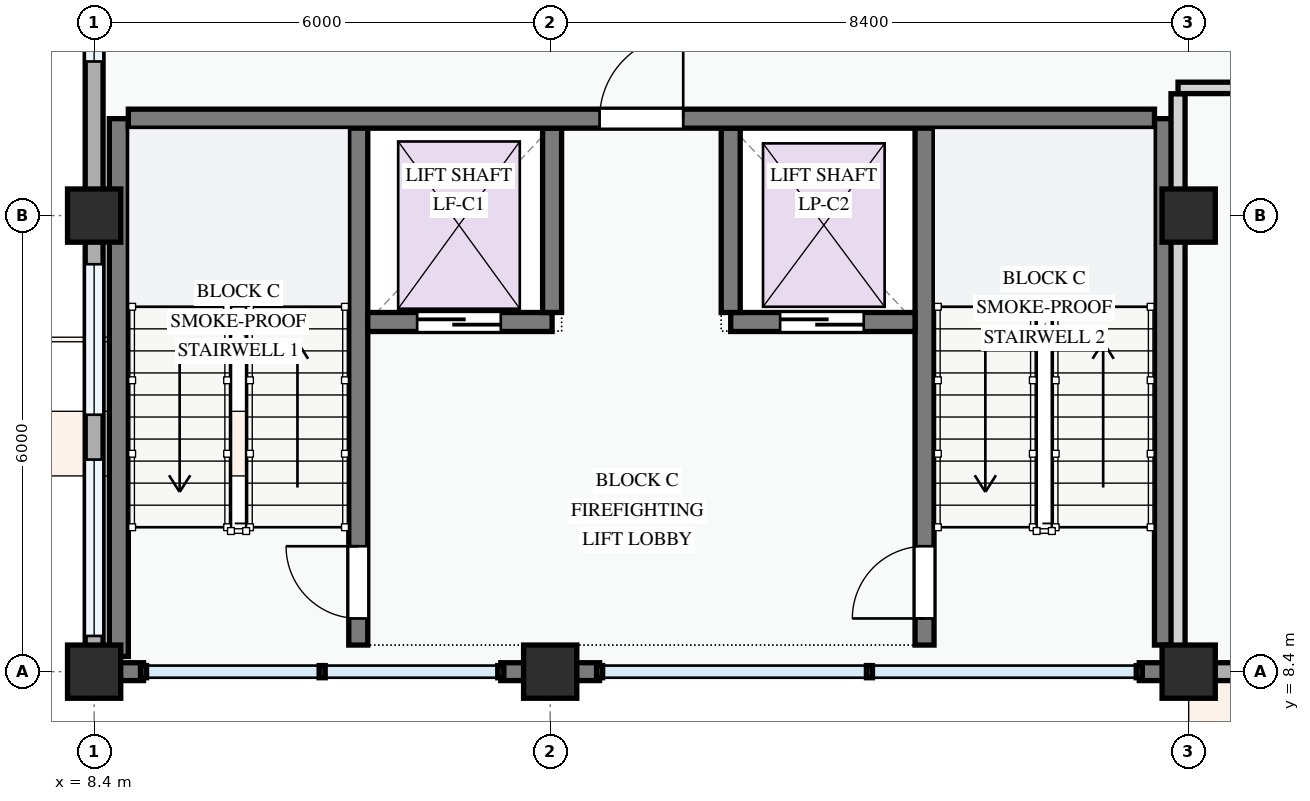
"""IFC4 building model, lengths in metres.
Left out: names, types, materials, properties, quantities, classifications, styles, units other than length and angle.
Written with IfcOpenShell. Run it as: python <this file> out.ifc"""

import sys

from ifc_helpers import new_model, si_unit, direction, frame, frame_2d, origin, origin_2d, place, context, subcontext, project, spatial, rectangle, extrude, element, fill, save


model = new_model("IFC4")
c1 = context("Model", 3, precision=1e-05, world=origin(), true_north=direction((0.0, 1.0)))
c2 = subcontext(c1, "Body", "Model", "MODEL_VIEW")
j1 = project(units=[si_unit("LENGTHUNIT", "METRE"), si_unit("PLANEANGLEUNIT", "RADIAN")], contexts=[c1])
p1 = place(None, origin())
s1 = spatial("IfcSite", under=j1, at=p1, CompositionType="ELEMENT")
p2 = place(p1, origin())
s2 = spatial("IfcBuilding", under=s1, at=p2, CompositionType="ELEMENT")
p3 = place(p2, frame((0.0, 0.0, 4.5)))
s3 = spatial("IfcBuildingStorey", under=s2, at=p3, CompositionType="ELEMENT", Elevation=4.5)
for number, where, z_axis, x_axis in (
    (1, (8.4, 8.4, 0.0), (0.0, 0.0, 1.0), (1.0, 0.0, 0.0)),
    (2, (8.4, 14.4, 0.0), (0.0, 0.0, 1.0), (1.0, 0.0, 0.0)),
    (3, (14.4, 8.4, 0.0), (0.0, 0.0, 1.0), (1.0, 0.0, 0.0)),
    (4, (22.8, 8.4, 0.0), (0.0, 0.0, 1.0), (1.0, 0.0, 0.0)),
    (5, (22.8, 14.4, 0.0), (0.0, 0.0, 1.0), (1.0, 0.0, 0.0)),
):
    element("IfcColumn", number, at=place(p3, frame(where, z_axis=z_axis, x_axis=x_axis)), inside=s3, PredefinedType="COLUMN", context=c2, shape_type="SweptSolid", body=[
        extrude(rectangle(XDim=0.7, YDim=0.7, at=origin_2d()), origin(), (0.0, 0.0, 1.0), 3.6),
    ])
p4 = place(p3, frame((8.4, 22.8, 0.0), z_axis=(0.0, 0.0, 1.0), x_axis=(0.0, -1.0, 0.0)))
e6 = element("IfcWall", 6, at=p4, inside=s3, PredefinedType="STANDARD", context=c2, shape_type="SweptSolid", body=[
    extrude(rectangle(XDim=8.4, YDim=0.235, at=frame_2d((4.2, 0.0))), origin(), (0.0, 0.0, 1.0), 2.725),
])
p5 = place(p4, frame((0.995, 0.0, 0.78)))
e7 = element("IfcOpeningElement", 7, at=p5, cuts=e6, PredefinedType="OPENING", context=c2, shape_type="SweptSolid", body=[
    extrude(rectangle(XDim=2.4, YDim=1.65, at=frame_2d((1.2, 0.825))), frame((0.0, 0.127, 0.0), z_axis=(0.0, -1.0, 0.0), x_axis=(1.0, 0.0, 0.0)), (0.0, 0.0, 1.0), 0.255),
])
p6 = place(p4, frame((4.952, 0.0, 0.78)))
e8 = element("IfcOpeningElement", 8, at=p6, cuts=e6, PredefinedType="OPENING", context=c2, shape_type="SweptSolid", body=[
    extrude(rectangle(XDim=1.42, YDim=1.38, at=frame_2d((0.71, 0.69))), frame((0.0, 0.127, 0.0), z_axis=(0.0, -1.0, 0.0), x_axis=(1.0, 0.0, 0.0)), (0.0, 0.0, 1.0), 0.255),
])
p7 = place(p3, frame((8.4, 14.4, 0.0), z_axis=(0.0, 0.0, 1.0), x_axis=(0.0, -1.0, 0.0)))
e9 = element("IfcWall", 9, at=p7, inside=s3, PredefinedType="STANDARD", context=c2, shape_type="SweptSolid", body=[
    extrude(rectangle(XDim=6.0, YDim=0.235, at=frame_2d((3.0, 0.0))), origin(), (0.0, 0.0, 1.0), 2.875),
])
p8 = place(p7, frame((0.64, 0.0, 0.78)))
e10 = element("IfcOpeningElement", 10, at=p8, cuts=e9, PredefinedType="OPENING", context=c2, shape_type="SweptSolid", body=[
    extrude(rectangle(XDim=1.98, YDim=1.5, at=frame_2d((0.99, 0.75))), frame((0.0, 0.127, 0.0), z_axis=(0.0, -1.0, 0.0), x_axis=(1.0, 0.0, 0.0)), (0.0, 0.0, 1.0), 0.255),
])
p9 = place(p7, frame((3.21, 0.0, 0.78)))
e11 = element("IfcOpeningElement", 11, at=p9, cuts=e9, PredefinedType="OPENING", context=c2, shape_type="SweptSolid", body=[
    extrude(rectangle(XDim=2.32, YDim=1.5, at=frame_2d((1.16, 0.75))), frame((0.0, 0.127, 0.0), z_axis=(0.0, -1.0, 0.0), x_axis=(1.0, 0.0, 0.0)), (0.0, 0.0, 1.0), 0.255),
])
p10 = place(p3, frame((8.52, 8.4, 0.0), z_axis=(0.0, 0.0, 1.0), x_axis=(1.0, 0.0, 0.0)))
e12 = element("IfcWall", 12, at=p10, inside=s3, PredefinedType="STANDARD", context=c2, shape_type="SweptSolid", body=[
    extrude(rectangle(XDim=0.531, YDim=0.235, at=frame_2d((0.265, 0.0))), origin(), (0.0, 0.0, 1.0), 3.34),
])
p11 = place(p3, frame((13.75, 8.4, 0.0), z_axis=(0.0, 0.0, 1.0), x_axis=(1.0, 0.0, 0.0)))
e13 = element("IfcWall", 13, at=p11, inside=s3, PredefinedType="STANDARD", context=c2, shape_type="SweptSolid", body=[
    extrude(rectangle(XDim=0.65, YDim=0.235, at=frame_2d((0.325, 0.0))), origin(), (0.0, 0.0, 1.0), 3.34),
])
for number, where, z_axis, x_axis in (
    (14, (14.4, 8.4, 0.0), (0.0, 0.0, 1.0), (1.0, 0.0, 0.0)),
    (15, (22.15, 8.4, 0.0), (0.0, 0.0, 1.0), (1.0, 0.0, 0.0)),
):
    element("IfcWall", number, at=place(p3, frame(where, z_axis=z_axis, x_axis=x_axis)), inside=s3, PredefinedType="STANDARD", context=c2, shape_type="SweptSolid", body=[
        extrude(rectangle(XDim=0.65, YDim=0.235, at=frame_2d((0.325, 0.0))), origin(), (0.0, 0.0, 1.0), 3.34),
    ])
p12 = place(p3, frame((22.8, 8.4, 0.0), z_axis=(0.0, 0.0, 1.0), x_axis=(1.0, 0.0, 0.0)))
e16 = element("IfcWall", 16, at=p12, inside=s3, PredefinedType="STANDARD", context=c2, shape_type="SweptSolid", body=[
    extrude(rectangle(XDim=6.0, YDim=0.235, at=frame_2d((3.0, 0.0))), origin(), (0.0, 0.0, 1.0), 2.775),
])
p13 = place(p12, frame((0.57, 0.0, 0.78)))
e17 = element("IfcOpeningElement", 17, at=p13, cuts=e16, PredefinedType="OPENING", context=c2, shape_type="SweptSolid", body=[
    extrude(rectangle(XDim=2.12, YDim=1.44, at=frame_2d((1.06, 0.72))), frame((0.0, 0.127, 0.0), z_axis=(0.0, -1.0, 0.0), x_axis=(1.0, 0.0, 0.0)), (0.0, 0.0, 1.0), 0.255),
])
p14 = place(p12, frame((3.82, 0.0, 0.78)))
e18 = element("IfcOpeningElement", 18, at=p14, cuts=e16, PredefinedType="OPENING", context=c2, shape_type="SweptSolid", body=[
    extrude(rectangle(XDim=1.1, YDim=1.3, at=frame_2d((0.55, 0.65))), frame((0.0, 0.127, 0.0), z_axis=(0.0, -1.0, 0.0), x_axis=(1.0, 0.0, 0.0)), (0.0, 0.0, 1.0), 0.255),
])
p15 = place(p3, frame((11.875, 8.75, 0.0), z_axis=(0.0, 0.0, 1.0), x_axis=(0.0, 1.0, 0.0)))
e19 = element("IfcWall", 19, at=p15, inside=s3, PredefinedType="SHEAR", context=c2, shape_type="SweptSolid", body=[
    extrude(rectangle(XDim=6.925, YDim=0.25, at=frame_2d((3.462, 0.0))), origin(), (0.0, 0.0, 1.0), 3.3),
])
p16 = place(p15, frame((0.35, 0.0, 0.0)))
e20 = element("IfcOpeningElement", 20, at=p16, cuts=e19, PredefinedType="OPENING", context=c2, shape_type="SweptSolid", body=[
    extrude(rectangle(XDim=0.95, YDim=2.1, at=frame_2d((0.475, 1.05))), frame((0.0, 0.135, 0.0), z_axis=(0.0, -1.0, 0.0), x_axis=(1.0, 0.0, 0.0)), (0.0, 0.0, 1.0), 0.27),
])
p17 = place(p3, frame((8.725, 8.6, 0.0), z_axis=(0.0, 0.0, 1.0), x_axis=(0.0, 1.0, 0.0)))
e21 = element("IfcWall", 21, at=p17, inside=s3, PredefinedType="SHEAR", context=c2, shape_type="SweptSolid", body=[
    extrude(rectangle(XDim=7.075, YDim=0.25, at=frame_2d((3.538, 0.0))), origin(), (0.0, 0.0, 1.0), 3.3),
])
p18 = place(p3, frame((22.475, 8.75, 0.0), z_axis=(0.0, 0.0, 1.0), x_axis=(0.0, 1.0, 0.0)))
e22 = element("IfcWall", 22, at=p18, inside=s3, PredefinedType="SHEAR", context=c2, shape_type="SweptSolid", body=[
    extrude(rectangle(XDim=6.925, YDim=0.25, at=frame_2d((3.462, 0.0))), origin(), (0.0, 0.0, 1.0), 3.3),
])
p19 = place(p3, frame((19.325, 8.75, 0.0), z_axis=(0.0, 0.0, 1.0), x_axis=(0.0, 1.0, 0.0)))
e23 = element("IfcWall", 23, at=p19, inside=s3, PredefinedType="SHEAR", context=c2, shape_type="SweptSolid", body=[
    extrude(rectangle(XDim=6.925, YDim=0.25, at=frame_2d((3.462, 0.0))), origin(), (0.0, 0.0, 1.0), 3.3),
])
p20 = place(p19, frame((0.35, 0.0, 0.0)))
e24 = element("IfcOpeningElement", 24, at=p20, cuts=e23, PredefinedType="OPENING", context=c2, shape_type="SweptSolid", body=[
    extrude(rectangle(XDim=0.95, YDim=2.1, at=frame_2d((0.475, 1.05))), frame((0.0, 0.135, 0.0), z_axis=(0.0, -1.0, 0.0), x_axis=(1.0, 0.0, 0.0)), (0.0, 0.0, 1.0), 0.27),
])
p21 = place(p3, frame((12.0, 13.0, 0.0), z_axis=(0.0, 0.0, 1.0), x_axis=(1.0, 0.0, 0.0)))
e25 = element("IfcWall", 25, at=p21, inside=s3, PredefinedType="SHEAR", context=c2, shape_type="SweptSolid", body=[
    extrude(rectangle(XDim=2.425, YDim=0.25, at=frame_2d((1.212, 0.0))), origin(), (0.0, 0.0, 1.0), 3.3),
])
p22 = place(p21, frame((0.65, 0.0, 0.0)))
e26 = element("IfcOpeningElement", 26, at=p22, cuts=e25, PredefinedType="OPENING", context=c2, shape_type="SweptSolid", body=[
    extrude(rectangle(XDim=1.1, YDim=2.15, at=frame_2d((0.55, 1.075))), frame((0.0, 0.135, 0.0), z_axis=(0.0, -1.0, 0.0), x_axis=(1.0, 0.0, 0.0)), (0.0, 0.0, 1.0), 0.27),
])
p23 = place(p3, frame((16.775, 13.0, 0.0), z_axis=(0.0, 0.0, 1.0), x_axis=(1.0, 0.0, 0.0)))
e27 = element("IfcWall", 27, at=p23, inside=s3, PredefinedType="SHEAR", context=c2, shape_type="SweptSolid", body=[
    extrude(rectangle(XDim=2.425, YDim=0.25, at=frame_2d((1.212, 0.0))), origin(), (0.0, 0.0, 1.0), 3.3),
])
p24 = place(p23, frame((0.65, 0.0, 0.0)))
e28 = element("IfcOpeningElement", 28, at=p24, cuts=e27, PredefinedType="OPENING", context=c2, shape_type="SweptSolid", body=[
    extrude(rectangle(XDim=1.1, YDim=2.15, at=frame_2d((0.55, 1.075))), frame((0.0, 0.135, 0.0), z_axis=(0.0, -1.0, 0.0), x_axis=(1.0, 0.0, 0.0)), (0.0, 0.0, 1.0), 0.27),
])
for number, where, z_axis, x_axis in (
    (29, (14.425, 13.125, 0.0), (0.0, 0.0, 1.0), (0.0, 1.0, 0.0)),
    (30, (16.775, 13.125, 0.0), (0.0, 0.0, 1.0), (0.0, 1.0, 0.0)),
):
    element("IfcWall", number, at=place(p3, frame(where, z_axis=z_axis, x_axis=x_axis)), inside=s3, PredefinedType="SHEAR", context=c2, shape_type="SweptSolid", body=[
        extrude(rectangle(XDim=2.425, YDim=0.25, at=frame_2d((1.212, 0.0))), origin(), (0.0, 0.0, 1.0), 3.3),
    ])
p25 = place(p3, frame((8.85, 15.675, 0.0), z_axis=(0.0, 0.0, 1.0), x_axis=(1.0, 0.0, 0.0)))
e31 = element("IfcWall", 31, at=p25, inside=s3, PredefinedType="SHEAR", context=c2, shape_type="SweptSolid", body=[
    extrude(rectangle(XDim=13.5, YDim=0.25, at=frame_2d((6.75, 0.0))), origin(), (0.0, 0.0, 1.0), 3.3),
])
p26 = place(p25, frame((6.2, 0.0, 0.0)))
e32 = element("IfcOpeningElement", 32, at=p26, cuts=e31, PredefinedType="OPENING", context=c2, shape_type="SweptSolid", body=[
    extrude(rectangle(XDim=1.1, YDim=2.15, at=frame_2d((0.55, 1.075))), frame((0.0, 0.135, 0.0), z_axis=(0.0, -1.0, 0.0), x_axis=(1.0, 0.0, 0.0)), (0.0, 0.0, 1.0), 0.27),
])
p27 = place(p3, frame((22.66, 8.52, 0.0), z_axis=(0.0, 0.0, 1.0), x_axis=(0.0, 1.0, 0.0)))
e33 = element("IfcWall", 33, at=p27, inside=s3, PredefinedType="PARTITIONING", context=c2, shape_type="SweptSolid", body=[
    extrude(rectangle(XDim=7.483, YDim=0.185, at=frame_2d((3.742, 0.0))), origin(), (0.0, 0.0, 1.0), 2.725),
])
p28 = place(p3, frame((22.66, 16.08, 0.0), z_axis=(0.0, 0.0, 1.0), x_axis=(1.0, 0.0, 0.0)))
e34 = element("IfcWall", 34, at=p28, inside=s3, PredefinedType="PARTITIONING", context=c2, shape_type="SweptSolid", body=[
    extrude(rectangle(XDim=34.88, YDim=0.15, at=frame_2d((17.44, 0.0))), origin(), (0.0, 0.0, 1.0), 3.3),
])
p29 = place(p28, frame((2.749, 0.0, 0.0)))
e35 = element("IfcOpeningElement", 35, at=p29, cuts=e34, PredefinedType="OPENING", context=c2, shape_type="SweptSolid", body=[
    extrude(rectangle(XDim=0.95, YDim=2.1, at=frame_2d((0.475, 1.05))), frame((0.0, 0.085, 0.0), z_axis=(0.0, -1.0, 0.0), x_axis=(1.0, 0.0, 0.0)), (0.0, 0.0, 1.0), 0.17),
])
p30 = place(p28, frame((9.966, 0.0, 0.0)))
e36 = element("IfcOpeningElement", 36, at=p30, cuts=e34, PredefinedType="OPENING", context=c2, shape_type="SweptSolid", body=[
    extrude(rectangle(XDim=0.95, YDim=2.1, at=frame_2d((0.475, 1.05))), frame((0.0, 0.085, 0.0), z_axis=(0.0, -1.0, 0.0), x_axis=(1.0, 0.0, 0.0)), (0.0, 0.0, 1.0), 0.17),
])
p31 = place(p28, frame((24.343, 0.0, 0.0)))
e37 = element("IfcOpeningElement", 37, at=p31, cuts=e34, PredefinedType="OPENING", context=c2, shape_type="SweptSolid", body=[
    extrude(rectangle(XDim=0.95, YDim=2.1, at=frame_2d((0.475, 1.05))), frame((0.0, 0.085, 0.0), z_axis=(0.0, -1.0, 0.0), x_axis=(1.0, 0.0, 0.0)), (0.0, 0.0, 1.0), 0.17),
])
p32 = place(p28, frame((31.542, 0.0, 0.0)))
e38 = element("IfcOpeningElement", 38, at=p32, cuts=e34, PredefinedType="OPENING", context=c2, shape_type="SweptSolid", body=[
    extrude(rectangle(XDim=0.95, YDim=2.1, at=frame_2d((0.475, 1.05))), frame((0.0, 0.085, 0.0), z_axis=(0.0, -1.0, 0.0), x_axis=(1.0, 0.0, 0.0)), (0.0, 0.0, 1.0), 0.17),
])
p33 = place(p6, origin())
e39 = element("IfcWindow", 39, at=p33, inside=s3, PartitioningType="SINGLE_PANEL", PredefinedType="WINDOW", context=c2, shape_type="SweptSolid", body=[
    extrude(rectangle(XDim=1.42, YDim=1.38, at=frame_2d((0.71, 0.69))), frame((0.0, 0.03, 0.0), z_axis=(0.0, -1.0, 0.0), x_axis=(1.0, 0.0, 0.0)), (0.0, 0.0, 1.0), 0.06),
])
fill(e8, e39)
p34 = place(p8, origin())
e40 = element("IfcWindow", 40, at=p34, inside=s3, PartitioningType="DOUBLE_PANEL_VERTICAL", PredefinedType="WINDOW", context=c2, shape_type="SweptSolid", body=[
    extrude(rectangle(XDim=1.98, YDim=1.5, at=frame_2d((0.99, 0.75))), frame((0.0, 0.03, 0.0), z_axis=(0.0, -1.0, 0.0), x_axis=(1.0, 0.0, 0.0)), (0.0, 0.0, 1.0), 0.06),
])
fill(e10, e40)
p35 = place(p9, origin())
e41 = element("IfcWindow", 41, at=p35, inside=s3, PartitioningType="DOUBLE_PANEL_VERTICAL", PredefinedType="WINDOW", context=c2, shape_type="SweptSolid", body=[
    extrude(rectangle(XDim=2.32, YDim=1.5, at=frame_2d((1.16, 0.75))), frame((0.0, 0.03, 0.0), z_axis=(0.0, -1.0, 0.0), x_axis=(1.0, 0.0, 0.0)), (0.0, 0.0, 1.0), 0.06),
])
fill(e11, e41)
p36 = place(p16, origin())
e42 = element("IfcDoor", 42, at=p36, inside=s3, OperationType="SINGLE_SWING_RIGHT", PredefinedType="DOOR", context=c2, shape_type="SweptSolid", body=[
    extrude(rectangle(XDim=0.95, YDim=2.1, at=frame_2d((0.475, 1.05))), frame((0.0, 0.025, 0.0), z_axis=(0.0, -1.0, 0.0), x_axis=(1.0, 0.0, 0.0)), (0.0, 0.0, 1.0), 0.05),
])
fill(e20, e42)
p37 = place(p20, origin())
e43 = element("IfcDoor", 43, at=p37, inside=s3, OperationType="SINGLE_SWING_LEFT", PredefinedType="DOOR", context=c2, shape_type="SweptSolid", body=[
    extrude(rectangle(XDim=0.95, YDim=2.1, at=frame_2d((0.475, 1.05))), frame((0.0, 0.025, 0.0), z_axis=(0.0, -1.0, 0.0), x_axis=(1.0, 0.0, 0.0)), (0.0, 0.0, 1.0), 0.05),
])
fill(e24, e43)
p38 = place(p22, origin())
e44 = element("IfcDoor", 44, at=p38, inside=s3, OperationType="SLIDING_TO_LEFT", PredefinedType="DOOR", context=c2, shape_type="SweptSolid", body=[
    extrude(rectangle(XDim=1.1, YDim=2.15, at=frame_2d((0.55, 1.075))), frame((0.0, 0.025, 0.0), z_axis=(0.0, -1.0, 0.0), x_axis=(1.0, 0.0, 0.0)), (0.0, 0.0, 1.0), 0.05),
])
fill(e26, e44)
p39 = place(p24, origin())
e45 = element("IfcDoor", 45, at=p39, inside=s3, OperationType="SLIDING_TO_LEFT", PredefinedType="DOOR", context=c2, shape_type="SweptSolid", body=[
    extrude(rectangle(XDim=1.1, YDim=2.15, at=frame_2d((0.55, 1.075))), frame((0.0, 0.025, 0.0), z_axis=(0.0, -1.0, 0.0), x_axis=(1.0, 0.0, 0.0)), (0.0, 0.0, 1.0), 0.05),
])
fill(e28, e45)
p40 = place(p26, origin())
e46 = element("IfcDoor", 46, at=p40, inside=s3, OperationType="SINGLE_SWING_RIGHT", PredefinedType="DOOR", context=c2, shape_type="SweptSolid", body=[
    extrude(rectangle(XDim=1.1, YDim=2.15, at=frame_2d((0.55, 1.075))), frame((0.0, 0.025, 0.0), z_axis=(0.0, -1.0, 0.0), x_axis=(1.0, 0.0, 0.0)), (0.0, 0.0, 1.0), 0.05),
])
fill(e32, e46)
save(model, sys.argv[1])
